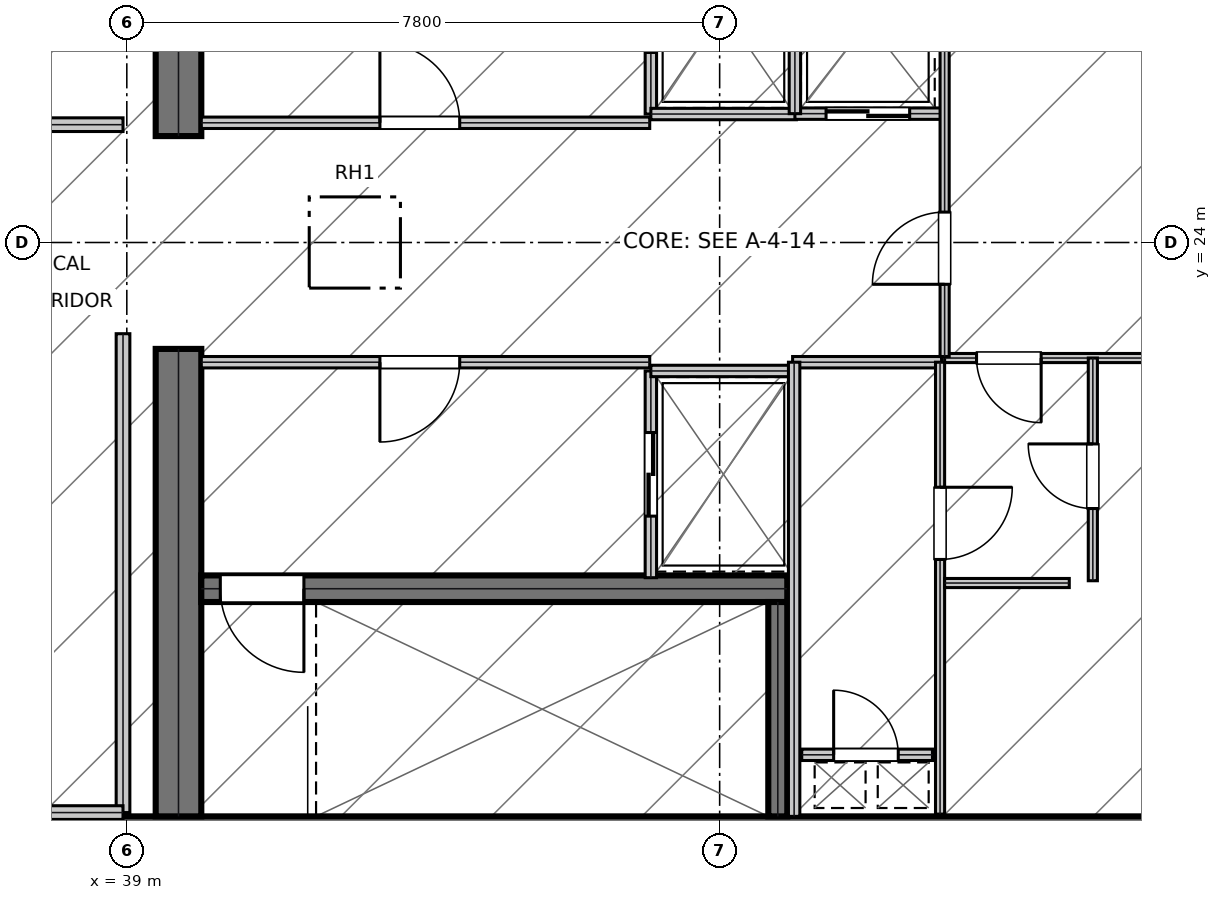
"""IFC4 building model, lengths in metres.
Left out: names, types, materials, properties, quantities, classifications, styles, units other than length and angle.
Written with IfcOpenShell. Run it as: python <this file> out.ifc"""

import sys

from ifc_helpers import new_model, si_unit, direction, frame, frame_2d, origin, origin_2d, place, context, subcontext, project, spatial, rectangle, extrude, element, fill, save


model = new_model("IFC4")
c1 = context("Model", 3, precision=1e-05, world=origin(), true_north=direction((0.0, 1.0)))
c2 = subcontext(c1, "Body", "Model", "MODEL_VIEW")
j1 = project(units=[si_unit("LENGTHUNIT", "METRE"), si_unit("PLANEANGLEUNIT", "RADIAN")], contexts=[c1])
p1 = place(None, origin())
s1 = spatial("IfcSite", under=j1, at=p1, CompositionType="ELEMENT")
p2 = place(p1, origin())
s2 = spatial("IfcBuilding", under=s1, at=p2, CompositionType="ELEMENT")
p3 = place(p2, frame((0.0, 0.0, 336.9)))
s3 = spatial("IfcBuildingStorey", under=s2, at=p3, CompositionType="ELEMENT", Elevation=336.9)
p4 = place(p3, frame((38.8, 16.15, 0.0), z_axis=(0.0, 0.0, 1.0), x_axis=(1.0, 0.0, 0.0)))
e1 = element("IfcWall", 1, at=p4, inside=s3, PredefinedType="SHEAR", context=c2, shape_type="SweptSolid", body=[
    extrude(rectangle(XDim=16.0, YDim=0.6, at=frame_2d((8.0, 0.0))), origin(), (0.0, 0.0, 1.0), 4.22),
])
for number, where, z_axis, x_axis in (
    (2, (39.68, 16.45, 0.0), (0.0, 0.0, 1.0), (0.0, 1.0, 0.0)),
    (3, (39.68, 25.4, 0.0), (0.0, 0.0, 1.0), (0.0, 1.0, 0.0)),
):
    element("IfcWall", number, at=place(p3, frame(where, z_axis=z_axis, x_axis=x_axis)), inside=s3, PredefinedType="SHEAR", context=c2, shape_type="SweptSolid", body=[
        extrude(rectangle(XDim=6.15, YDim=0.6, at=frame_2d((3.075, 0.0))), origin(), (0.0, 0.0, 1.0), 4.22),
    ])
p5 = place(p3, frame((39.98, 19.445, 0.0), z_axis=(0.0, 0.0, 1.0), x_axis=(1.0, 0.0, 0.0)))
e4 = element("IfcWall", 4, at=p5, inside=s3, PredefinedType="SHEAR", context=c2, shape_type="SweptSolid", body=[
    extrude(rectangle(XDim=7.71, YDim=0.35, at=frame_2d((3.855, 0.0))), origin(), (0.0, 0.0, 1.0), 4.22),
])
p6 = place(p5, frame((0.25, 0.0, 0.0)))
e5 = element("IfcOpeningElement", 5, at=p6, cuts=e4, PredefinedType="OPENING", context=c2, shape_type="SweptSolid", body=[
    extrude(rectangle(XDim=1.1, YDim=2.15, at=frame_2d((0.55, 1.075))), frame((0.0, 0.185, 0.0), z_axis=(0.0, -1.0, 0.0), x_axis=(1.0, 0.0, 0.0)), (0.0, 0.0, 1.0), 0.37),
])
p7 = place(p3, frame((47.565, 16.45, 0.0), z_axis=(0.0, 0.0, 1.0), x_axis=(0.0, 1.0, 0.0)))
e6 = element("IfcWall", 6, at=p7, inside=s3, PredefinedType="SHEAR", context=c2, shape_type="SweptSolid", body=[
    extrude(rectangle(XDim=2.82, YDim=0.25, at=frame_2d((1.41, 0.0))), origin(), (0.0, 0.0, 1.0), 4.22),
])
p8 = place(p3, frame((39.98, 25.575, 0.0), z_axis=(0.0, 0.0, 1.0), x_axis=(1.0, 0.0, 0.0)))
e7 = element("IfcWall", 7, at=p8, inside=s3, PredefinedType="PARTITIONING", context=c2, shape_type="SweptSolid", body=[
    extrude(rectangle(XDim=5.9, YDim=0.15, at=frame_2d((2.95, 0.0))), origin(), (0.0, 0.0, 1.0), 4.22),
])
p9 = place(p8, frame((2.35, 0.0, 0.0)))
e8 = element("IfcOpeningElement", 8, at=p9, cuts=e7, PredefinedType="OPENING", context=c2, shape_type="SweptSolid", body=[
    extrude(rectangle(XDim=1.05, YDim=2.15, at=frame_2d((0.525, 1.075))), frame((0.0, 0.085, 0.0), z_axis=(0.0, -1.0, 0.0), x_axis=(1.0, 0.0, 0.0)), (0.0, 0.0, 1.0), 0.17),
])
p10 = place(p3, frame((39.98, 22.425, 0.0), z_axis=(0.0, 0.0, 1.0), x_axis=(1.0, 0.0, 0.0)))
e9 = element("IfcWall", 9, at=p10, inside=s3, PredefinedType="PARTITIONING", context=c2, shape_type="SweptSolid", body=[
    extrude(rectangle(XDim=5.9, YDim=0.15, at=frame_2d((2.95, 0.0))), origin(), (0.0, 0.0, 1.0), 4.22),
])
p11 = place(p10, frame((2.35, 0.0, 0.0)))
e10 = element("IfcOpeningElement", 10, at=p11, cuts=e9, PredefinedType="OPENING", context=c2, shape_type="SweptSolid", body=[
    extrude(rectangle(XDim=1.05, YDim=2.15, at=frame_2d((0.525, 1.075))), frame((0.0, 0.085, 0.0), z_axis=(0.0, -1.0, 0.0), x_axis=(1.0, 0.0, 0.0)), (0.0, 0.0, 1.0), 0.17),
])
p12 = place(p3, frame((45.895, 25.69, 0.0), z_axis=(0.0, 0.0, 1.0), x_axis=(0.0, 1.0, 0.0)))
e11 = element("IfcWall", 11, at=p12, inside=s3, PredefinedType="PARTITIONING", context=c2, shape_type="SweptSolid", body=[
    extrude(rectangle(XDim=2.72, YDim=0.15, at=frame_2d((1.36, 0.0))), origin(), (0.0, 0.0, 1.0), 4.22),
])
p13 = place(p12, frame((0.81, 0.0, 0.0)))
e12 = element("IfcOpeningElement", 12, at=p13, cuts=e11, PredefinedType="OPENING", context=c2, shape_type="SweptSolid", body=[
    extrude(rectangle(XDim=1.1, YDim=2.15, at=frame_2d((0.55, 1.075))), frame((0.0, 0.085, 0.0), z_axis=(0.0, -1.0, 0.0), x_axis=(1.0, 0.0, 0.0)), (0.0, 0.0, 1.0), 0.17),
])
p14 = place(p3, frame((45.895, 25.69, 0.0), z_axis=(0.0, 0.0, 1.0), x_axis=(1.0, 0.0, 0.0)))
e13 = element("IfcWall", 13, at=p14, inside=s3, PredefinedType="PARTITIONING", context=c2, shape_type="SweptSolid", body=[
    extrude(rectangle(XDim=1.915, YDim=0.15, at=frame_2d((0.958, 0.0))), origin(), (0.0, 0.0, 1.0), 4.22),
])
p15 = place(p3, frame((45.895, 19.59, 0.0), z_axis=(0.0, 0.0, 1.0), x_axis=(0.0, 1.0, 0.0)))
e14 = element("IfcWall", 14, at=p15, inside=s3, PredefinedType="PARTITIONING", context=c2, shape_type="SweptSolid", body=[
    extrude(rectangle(XDim=2.72, YDim=0.15, at=frame_2d((1.36, 0.0))), origin(), (0.0, 0.0, 1.0), 4.22),
])
p16 = place(p15, frame((0.81, 0.0, 0.0)))
e15 = element("IfcOpeningElement", 15, at=p16, cuts=e14, PredefinedType="OPENING", context=c2, shape_type="SweptSolid", body=[
    extrude(rectangle(XDim=1.1, YDim=2.15, at=frame_2d((0.55, 1.075))), frame((0.0, 0.085, 0.0), z_axis=(0.0, -1.0, 0.0), x_axis=(1.0, 0.0, 0.0)), (0.0, 0.0, 1.0), 0.17),
])
p17 = place(p3, frame((45.895, 22.31, 0.0), z_axis=(0.0, 0.0, 1.0), x_axis=(1.0, 0.0, 0.0)))
e16 = element("IfcWall", 16, at=p17, inside=s3, PredefinedType="PARTITIONING", context=c2, shape_type="SweptSolid", body=[
    extrude(rectangle(XDim=1.915, YDim=0.15, at=frame_2d((0.958, 0.0))), origin(), (0.0, 0.0, 1.0), 4.22),
])
p18 = place(p3, frame((47.79, 25.695, 0.0), z_axis=(0.0, 0.0, 1.0), x_axis=(1.0, 0.0, 0.0)))
e17 = element("IfcWall", 17, at=p18, inside=s3, PredefinedType="PARTITIONING", context=c2, shape_type="SweptSolid", body=[
    extrude(rectangle(XDim=1.92, YDim=0.15, at=frame_2d((0.96, 0.0))), origin(), (0.0, 0.0, 1.0), 4.22),
])
p19 = place(p18, frame((0.41, 0.0, 0.0)))
e18 = element("IfcOpeningElement", 18, at=p19, cuts=e17, PredefinedType="OPENING", context=c2, shape_type="SweptSolid", body=[
    extrude(rectangle(XDim=1.1, YDim=2.15, at=frame_2d((0.55, 1.075))), frame((0.0, 0.085, 0.0), z_axis=(0.0, -1.0, 0.0), x_axis=(1.0, 0.0, 0.0)), (0.0, 0.0, 1.0), 0.17),
])
p20 = place(p3, frame((47.79, 25.695, 0.0), z_axis=(0.0, 0.0, 1.0), x_axis=(0.0, 1.0, 0.0)))
e19 = element("IfcWall", 19, at=p20, inside=s3, PredefinedType="PARTITIONING", context=c2, shape_type="SweptSolid", body=[
    extrude(rectangle(XDim=2.415, YDim=0.15, at=frame_2d((1.208, 0.0))), origin(), (0.0, 0.0, 1.0), 4.22),
])
p21 = place(p3, frame((47.88, 17.26, 0.0), z_axis=(0.0, 0.0, 1.0), x_axis=(1.0, 0.0, 0.0)))
e20 = element("IfcWall", 20, at=p21, inside=s3, PredefinedType="PARTITIONING", context=c2, shape_type="SweptSolid", body=[
    extrude(rectangle(XDim=1.72, YDim=0.15, at=frame_2d((0.86, 0.0))), origin(), (0.0, 0.0, 1.0), 4.22),
])
p22 = place(p21, frame((0.42, 0.0, 0.0)))
e21 = element("IfcOpeningElement", 21, at=p22, cuts=e20, PredefinedType="OPENING", context=c2, shape_type="SweptSolid", body=[
    extrude(rectangle(XDim=0.85, YDim=2.15, at=frame_2d((0.425, 1.075))), frame((0.0, 0.085, 0.0), z_axis=(0.0, -1.0, 0.0), x_axis=(1.0, 0.0, 0.0)), (0.0, 0.0, 1.0), 0.17),
])
p23 = place(p3, frame((47.76, 22.425, 0.0), z_axis=(0.0, 0.0, 1.0), x_axis=(1.0, 0.0, 0.0)))
e22 = element("IfcWall", 22, at=p23, inside=s3, PredefinedType="PARTITIONING", context=c2, shape_type="SweptSolid", body=[
    extrude(rectangle(XDim=1.96, YDim=0.15, at=frame_2d((0.98, 0.0))), origin(), (0.0, 0.0, 1.0), 4.22),
])
p24 = place(p3, frame((47.78, 16.45, 0.0), z_axis=(0.0, 0.0, 1.0), x_axis=(0.0, 1.0, 0.0)))
e23 = element("IfcWall", 23, at=p24, inside=s3, PredefinedType="PARTITIONING", context=c2, shape_type="SweptSolid", body=[
    extrude(rectangle(XDim=5.975, YDim=0.15, at=frame_2d((2.988, 0.0))), origin(), (0.0, 0.0, 1.0), 4.22),
])
p25 = place(p3, frame((49.7, 16.48, 0.0), z_axis=(0.0, 0.0, 1.0), x_axis=(0.0, 1.0, 0.0)))
e24 = element("IfcWall", 24, at=p25, inside=s3, PredefinedType="PARTITIONING", context=c2, shape_type="SweptSolid", body=[
    extrude(rectangle(XDim=5.945, YDim=0.12, at=frame_2d((2.973, 0.0))), origin(), (0.0, 0.0, 1.0), 4.22),
])
p26 = place(p25, frame((3.35, 0.0, 0.0)))
e25 = element("IfcOpeningElement", 25, at=p26, cuts=e24, PredefinedType="OPENING", context=c2, shape_type="SweptSolid", body=[
    extrude(rectangle(XDim=0.95, YDim=2.15, at=frame_2d((0.475, 1.075))), frame((0.0, 0.07, 0.0), z_axis=(0.0, -1.0, 0.0), x_axis=(1.0, 0.0, 0.0)), (0.0, 0.0, 1.0), 0.14),
])
p27 = place(p3, frame((49.76, 22.48, 0.0), z_axis=(0.0, 0.0, 1.0), x_axis=(1.0, 0.0, 0.0)))
e26 = element("IfcWall", 26, at=p27, inside=s3, PredefinedType="PARTITIONING", context=c2, shape_type="SweptSolid", body=[
    extrude(rectangle(XDim=3.9, YDim=0.12, at=frame_2d((1.95, 0.0))), origin(), (0.0, 0.0, 1.0), 4.22),
])
p28 = place(p27, frame((0.42, 0.0, 0.0)))
e27 = element("IfcOpeningElement", 27, at=p28, cuts=e26, PredefinedType="OPENING", context=c2, shape_type="SweptSolid", body=[
    extrude(rectangle(XDim=0.85, YDim=2.15, at=frame_2d((0.425, 1.075))), frame((0.0, 0.07, 0.0), z_axis=(0.0, -1.0, 0.0), x_axis=(1.0, 0.0, 0.0)), (0.0, 0.0, 1.0), 0.14),
])
p29 = place(p3, frame((51.71, 19.55, 0.0), z_axis=(0.0, 0.0, 1.0), x_axis=(0.0, 1.0, 0.0)))
e28 = element("IfcWall", 28, at=p29, inside=s3, PredefinedType="PARTITIONING", context=c2, shape_type="SweptSolid", body=[
    extrude(rectangle(XDim=2.93, YDim=0.12, at=frame_2d((1.465, 0.0))), origin(), (0.0, 0.0, 1.0), 4.22),
])
p30 = place(p29, frame((0.95, 0.0, 0.0)))
e29 = element("IfcOpeningElement", 29, at=p30, cuts=e28, PredefinedType="OPENING", context=c2, shape_type="SweptSolid", body=[
    extrude(rectangle(XDim=0.85, YDim=2.15, at=frame_2d((0.425, 1.075))), frame((0.0, 0.07, 0.0), z_axis=(0.0, -1.0, 0.0), x_axis=(1.0, 0.0, 0.0)), (0.0, 0.0, 1.0), 0.14),
])
p31 = place(p3, frame((49.76, 19.52, 0.0), z_axis=(0.0, 0.0, 1.0), x_axis=(1.0, 0.0, 0.0)))
e30 = element("IfcWall", 30, at=p31, inside=s3, PredefinedType="PARTITIONING", context=c2, shape_type="SweptSolid", body=[
    extrude(rectangle(XDim=1.64, YDim=0.12, at=frame_2d((0.82, 0.0))), origin(), (0.0, 0.0, 1.0), 4.22),
])
p32 = place(p3, frame((49.76, 22.5, 0.0), z_axis=(0.0, 0.0, 1.0), x_axis=(0.0, 1.0, 0.0)))
e31 = element("IfcWall", 31, at=p32, inside=s3, PredefinedType="PARTITIONING", context=c2, shape_type="SweptSolid", body=[
    extrude(rectangle(XDim=5.72, YDim=0.12, at=frame_2d((2.86, 0.0))), origin(), (0.0, 0.0, 1.0), 4.22),
])
p33 = place(p32, frame((0.95, 0.0, 0.0)))
e32 = element("IfcOpeningElement", 32, at=p33, cuts=e31, PredefinedType="OPENING", context=c2, shape_type="SweptSolid", body=[
    extrude(rectangle(XDim=0.95, YDim=2.15, at=frame_2d((0.475, 1.075))), frame((0.0, 0.07, 0.0), z_axis=(0.0, -1.0, 0.0), x_axis=(1.0, 0.0, 0.0)), (0.0, 0.0, 1.0), 0.14),
])
p34 = place(p3, frame((38.95, 16.5, 0.0), z_axis=(0.0, 0.0, 1.0), x_axis=(0.0, 1.0, 0.0)))
e33 = element("IfcWall", 33, at=p34, inside=s3, PredefinedType="SOLIDWALL", context=c2, shape_type="SweptSolid", body=[
    extrude(rectangle(XDim=6.3, YDim=0.18, at=frame_2d((3.15, 0.0))), origin(), (0.0, 0.0, 1.0), 3.9),
])
for number, where, z_axis, x_axis in (
    (34, (37.05, 16.5, 0.0), (0.0, 0.0, 1.0), (1.0, 0.0, 0.0)),
    (35, (37.05, 25.55, 0.0), (0.0, 0.0, 1.0), (1.0, 0.0, 0.0)),
):
    element("IfcWall", number, at=place(p3, frame(where, z_axis=z_axis, x_axis=x_axis)), inside=s3, PredefinedType="SOLIDWALL", context=c2, shape_type="SweptSolid", body=[
        extrude(rectangle(XDim=1.9, YDim=0.18, at=frame_2d((0.95, 0.0))), origin(), (0.0, 0.0, 1.0), 4.22),
    ])
p35 = place(p3, frame((0.0, 0.0, 4.17)))
p36 = place(p35, frame((42.0, 24.0, 0.23)))
e36 = element("IfcWindow", 36, at=p36, inside=s3, PartitioningType="SINGLE_PANEL", PredefinedType="SKYLIGHT", context=c2, shape_type="SweptSolid", body=[
    extrude(rectangle(XDim=1.2, YDim=1.2, at=origin_2d()), origin(), (0.0, 0.0, 1.0), 0.05),
])
p37 = place(p9, origin())
e37 = element("IfcDoor", 37, at=p37, inside=s3, OperationType="SINGLE_SWING_LEFT", PredefinedType="DOOR", context=c2, shape_type="SweptSolid", body=[
    extrude(rectangle(XDim=1.05, YDim=2.15, at=frame_2d((0.525, 1.075))), frame((0.0, 0.025, 0.0), z_axis=(0.0, -1.0, 0.0), x_axis=(1.0, 0.0, 0.0)), (0.0, 0.0, 1.0), 0.05),
])
fill(e8, e37)
p38 = place(p11, frame((1.05, 0.0, 0.0), z_axis=(0.0, 0.0, 1.0), x_axis=(-1.0, 0.0, 0.0)))
e38 = element("IfcDoor", 38, at=p38, inside=s3, OperationType="SINGLE_SWING_RIGHT", PredefinedType="DOOR", context=c2, shape_type="SweptSolid", body=[
    extrude(rectangle(XDim=1.05, YDim=2.15, at=frame_2d((0.525, 1.075))), frame((0.0, 0.025, 0.0), z_axis=(0.0, -1.0, 0.0), x_axis=(1.0, 0.0, 0.0)), (0.0, 0.0, 1.0), 0.05),
])
fill(e10, e38)
p39 = place(p16, frame((1.1, 0.0, 0.0), z_axis=(0.0, 0.0, 1.0), x_axis=(-1.0, 0.0, 0.0)))
e39 = element("IfcDoor", 39, at=p39, inside=s3, OperationType="DOUBLE_DOOR_SLIDING", PredefinedType="DOOR", context=c2, shape_type="SweptSolid", body=[
    extrude(rectangle(XDim=1.1, YDim=2.15, at=frame_2d((0.55, 1.075))), frame((0.0, 0.025, 0.0), z_axis=(0.0, -1.0, 0.0), x_axis=(1.0, 0.0, 0.0)), (0.0, 0.0, 1.0), 0.05),
])
fill(e15, e39)
p40 = place(p19, frame((1.1, 0.0, 0.0), z_axis=(0.0, 0.0, 1.0), x_axis=(-1.0, 0.0, 0.0)))
e40 = element("IfcDoor", 40, at=p40, inside=s3, OperationType="DOUBLE_DOOR_SLIDING", PredefinedType="DOOR", context=c2, shape_type="SweptSolid", body=[
    extrude(rectangle(XDim=1.1, YDim=2.15, at=frame_2d((0.55, 1.075))), frame((0.0, 0.025, 0.0), z_axis=(0.0, -1.0, 0.0), x_axis=(1.0, 0.0, 0.0)), (0.0, 0.0, 1.0), 0.05),
])
fill(e18, e40)
p41 = place(p22, origin())
e41 = element("IfcDoor", 41, at=p41, inside=s3, OperationType="SINGLE_SWING_LEFT", PredefinedType="TRAPDOOR", context=c2, shape_type="SweptSolid", body=[
    extrude(rectangle(XDim=0.85, YDim=2.15, at=frame_2d((0.425, 1.075))), frame((0.0, 0.025, 0.0), z_axis=(0.0, -1.0, 0.0), x_axis=(1.0, 0.0, 0.0)), (0.0, 0.0, 1.0), 0.05),
])
fill(e21, e41)
p42 = place(p26, frame((0.95, 0.0, 0.0), z_axis=(0.0, 0.0, 1.0), x_axis=(-1.0, 0.0, 0.0)))
e42 = element("IfcDoor", 42, at=p42, inside=s3, OperationType="SINGLE_SWING_LEFT", PredefinedType="DOOR", context=c2, shape_type="SweptSolid", body=[
    extrude(rectangle(XDim=0.95, YDim=2.15, at=frame_2d((0.475, 1.075))), frame((0.0, 0.025, 0.0), z_axis=(0.0, -1.0, 0.0), x_axis=(1.0, 0.0, 0.0)), (0.0, 0.0, 1.0), 0.05),
])
fill(e25, e42)
p43 = place(p28, frame((0.85, 0.0, 0.0), z_axis=(0.0, 0.0, 1.0), x_axis=(-1.0, 0.0, 0.0)))
e43 = element("IfcDoor", 43, at=p43, inside=s3, OperationType="SINGLE_SWING_LEFT", PredefinedType="DOOR", context=c2, shape_type="SweptSolid", body=[
    extrude(rectangle(XDim=0.85, YDim=2.15, at=frame_2d((0.425, 1.075))), frame((0.0, 0.025, 0.0), z_axis=(0.0, -1.0, 0.0), x_axis=(1.0, 0.0, 0.0)), (0.0, 0.0, 1.0), 0.05),
])
fill(e27, e43)
p44 = place(p30, origin())
e44 = element("IfcDoor", 44, at=p44, inside=s3, OperationType="SINGLE_SWING_RIGHT", PredefinedType="DOOR", context=c2, shape_type="SweptSolid", body=[
    extrude(rectangle(XDim=0.85, YDim=2.15, at=frame_2d((0.425, 1.075))), frame((0.0, 0.025, 0.0), z_axis=(0.0, -1.0, 0.0), x_axis=(1.0, 0.0, 0.0)), (0.0, 0.0, 1.0), 0.05),
])
fill(e29, e44)
p45 = place(p33, origin())
e45 = element("IfcDoor", 45, at=p45, inside=s3, OperationType="SINGLE_SWING_LEFT", PredefinedType="DOOR", context=c2, shape_type="SweptSolid", body=[
    extrude(rectangle(XDim=0.95, YDim=2.15, at=frame_2d((0.475, 1.075))), frame((0.0, 0.025, 0.0), z_axis=(0.0, -1.0, 0.0), x_axis=(1.0, 0.0, 0.0)), (0.0, 0.0, 1.0), 0.05),
])
fill(e32, e45)
p46 = place(p6, frame((1.1, 0.0, 0.0), z_axis=(0.0, 0.0, 1.0), x_axis=(-1.0, 0.0, 0.0)))
e46 = element("IfcDoor", 46, at=p46, inside=s3, OperationType="SINGLE_SWING_LEFT", PredefinedType="DOOR", context=c2, shape_type="SweptSolid", body=[
    extrude(rectangle(XDim=1.1, YDim=2.15, at=frame_2d((0.55, 1.075))), frame((0.0, 0.025, 0.0), z_axis=(0.0, -1.0, 0.0), x_axis=(1.0, 0.0, 0.0)), (0.0, 0.0, 1.0), 0.05),
])
fill(e5, e46)
save(model, sys.argv[1])
